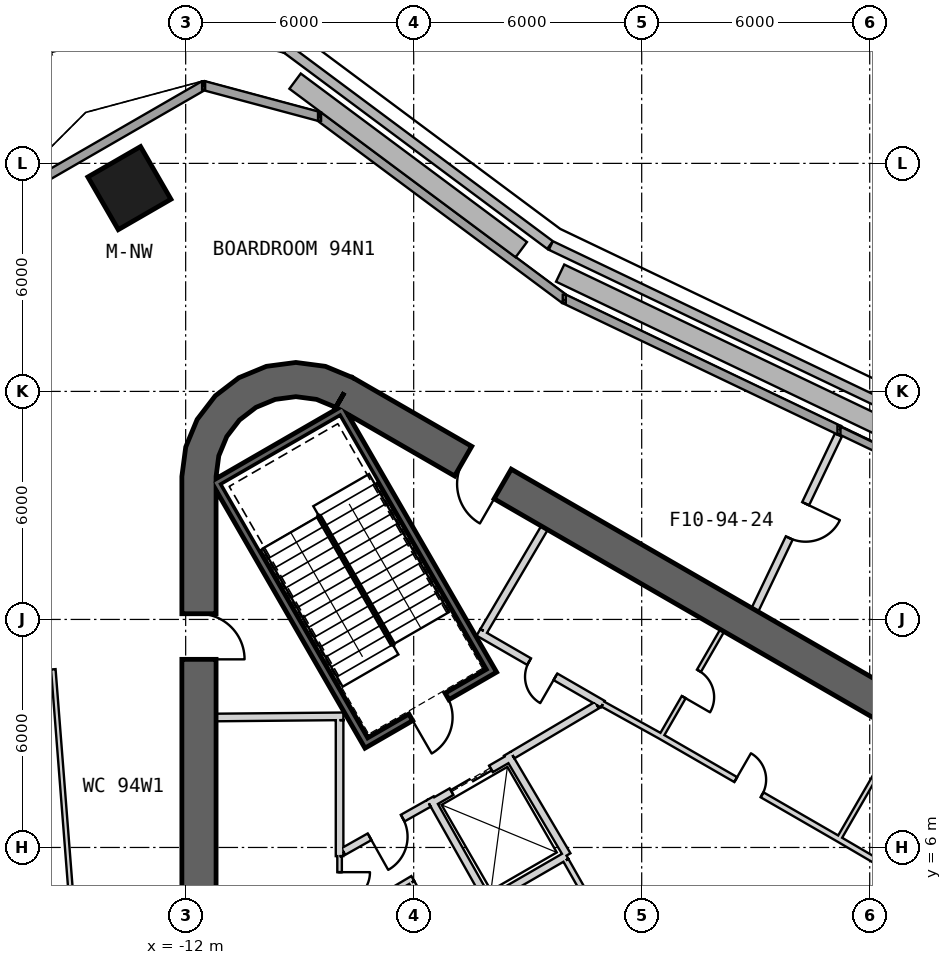
"""IFC4 building model, lengths in metres.
Left out: names, types, materials, properties, quantities, classifications, styles, units other than length and angle.
Written with IfcOpenShell. Run it as: python <this file> out.ifc"""

import sys

from ifc_helpers import new_model, si_unit, direction, frame, frame_2d, origin, origin_2d, place, context, subcontext, project, spatial, polyline, rectangle, outline, extrude, element, fill, save


model = new_model("IFC4")
c1 = context("Model", 3, precision=1e-05, world=origin(), true_north=direction((0.0, 1.0)))
c2 = subcontext(c1, "Body", "Model", "MODEL_VIEW")
j1 = project(units=[si_unit("LENGTHUNIT", "METRE"), si_unit("PLANEANGLEUNIT", "RADIAN")], contexts=[c1])
p1 = place(None, origin())
s1 = spatial("IfcSite", under=j1, at=p1, CompositionType="ELEMENT")
p2 = place(p1, origin())
s2 = spatial("IfcBuilding", under=s1, at=p2, CompositionType="ELEMENT")
p3 = place(p2, frame((0.0, 0.0, 415.3)))
s3 = spatial("IfcBuildingStorey", under=s2, at=p3, CompositionType="ELEMENT", Elevation=415.3)
p4 = place(p3, frame((-13.48, 23.349, -0.25), z_axis=(0.0, 0.0, 1.0), x_axis=(-0.5, 0.866025403784, 0.0)))
e1 = element("IfcColumn", 1, at=p4, inside=s3, PredefinedType="COLUMN", context=c2, shape_type="SweptSolid", body=[
    extrude(rectangle(XDim=1.6, YDim=1.6, at=origin_2d()), origin(), (0.0, 0.0, 1.0), 5.0),
])
p5 = place(p3, frame((19.475, 2.208, 0.0), z_axis=(0.0, 0.0, 1.0), x_axis=(-0.866028369851, 0.499994862586, 0.0)))
e2 = element("IfcWall", 2, at=p5, inside=s3, PredefinedType="SHEAR", context=c2, shape_type="SweptSolid", body=[
    extrude(rectangle(XDim=31.523, YDim=0.9, at=frame_2d((15.762, 0.0))), origin(), (0.0, 0.0, 1.0), 5.0),
])
p6 = place(p5, frame((3.612, 0.0, 0.0)))
e3 = element("IfcOpeningElement", 3, at=p6, cuts=e2, PredefinedType="OPENING", context=c2, shape_type="SweptSolid", body=[
    extrude(rectangle(XDim=1.2, YDim=2.4, at=frame_2d((0.6, 1.2))), frame((0.0, 0.46, 0.0), z_axis=(0.0, -1.0, 0.0), x_axis=(1.0, 0.0, 0.0)), (0.0, 0.0, 1.0), 0.92),
])
p7 = place(p5, frame((26.712, 0.0, 0.0)))
e4 = element("IfcOpeningElement", 4, at=p7, cuts=e2, PredefinedType="OPENING", context=c2, shape_type="SweptSolid", body=[
    extrude(rectangle(XDim=1.2, YDim=2.4, at=frame_2d((0.6, 1.2))), frame((0.0, 0.46, 0.0), z_axis=(0.0, -1.0, 0.0), x_axis=(1.0, 0.0, 0.0)), (0.0, 0.0, 1.0), 0.92),
])
p8 = place(p3, frame((-11.65, 15.762, 0.0), z_axis=(0.0, 0.0, 1.0), x_axis=(0.0, -1.0, 0.0)))
e5 = element("IfcWall", 5, at=p8, inside=s3, PredefinedType="SHEAR", context=c2, shape_type="SweptSolid", body=[
    extrude(rectangle(XDim=31.523, YDim=0.9, at=frame_2d((15.762, 0.0))), origin(), (0.0, 0.0, 1.0), 5.0),
])
p9 = place(p8, frame((3.612, 0.0, 0.0)))
e6 = element("IfcOpeningElement", 6, at=p9, cuts=e5, PredefinedType="OPENING", context=c2, shape_type="SweptSolid", body=[
    extrude(rectangle(XDim=1.2, YDim=2.4, at=frame_2d((0.6, 1.2))), frame((0.0, 0.46, 0.0), z_axis=(0.0, -1.0, 0.0), x_axis=(1.0, 0.0, 0.0)), (0.0, 0.0, 1.0), 0.92),
])
p10 = place(p8, frame((26.712, 0.0, 0.0)))
e7 = element("IfcOpeningElement", 7, at=p10, cuts=e5, PredefinedType="OPENING", context=c2, shape_type="SweptSolid", body=[
    extrude(rectangle(XDim=1.2, YDim=2.4, at=frame_2d((0.6, 1.2))), frame((0.0, 0.46, 0.0), z_axis=(0.0, -1.0, 0.0), x_axis=(1.0, 0.0, 0.0)), (0.0, 0.0, 1.0), 0.92),
])
p11 = place(p3, origin())
e8 = element("IfcWall", 8, at=p11, inside=s3, PredefinedType="SHEAR", context=c2, shape_type="SweptSolid", body=[
    extrude(outline(polyline([(-7.6, 18.36), (-8.323, 18.659), (-9.1, 18.762), (-9.876, 18.659), (-10.6, 18.36), (-11.221, 17.883), (-11.698, 17.262), (-11.998, 16.538), (-12.1, 15.762), (-11.2, 15.762), (-11.128, 16.305), (-10.919, 16.812), (-10.585, 17.247), (-10.15, 17.58), (-9.644, 17.79), (-9.1, 17.862), (-8.556, 17.79), (-8.05, 17.58), (-7.6, 18.36)])), origin(), (0.0, 0.0, 1.0), 5.0),
])
p12 = place(p3, frame((5.203, 16.976, 0.0), z_axis=(0.0, 0.0, 1.0), x_axis=(-0.902309733551, 0.431088325913, 0.0)))
e9 = element("IfcWall", 9, at=p12, inside=s3, PredefinedType="SOLIDWALL", context=c2, shape_type="SweptSolid", body=[
    extrude(rectangle(XDim=8.024, YDim=0.24, at=frame_2d((4.012, 0.0))), origin(), (0.0, 0.0, 1.0), 4.75),
])
p13 = place(p3, frame((-2.037, 20.435, 0.0), z_axis=(0.0, 0.0, 1.0), x_axis=(-0.801980505983, 0.59735020551, 0.0)))
e10 = element("IfcWall", 10, at=p13, inside=s3, PredefinedType="SOLIDWALL", context=c2, shape_type="SweptSolid", body=[
    extrude(rectangle(XDim=8.03, YDim=0.24, at=frame_2d((4.015, 0.0))), origin(), (0.0, 0.0, 1.0), 4.75),
])
p14 = place(p3, frame((-8.477, 25.231, 0.0), z_axis=(0.0, 0.0, 1.0), x_axis=(-0.96594046017, 0.258764424539, 0.0)))
e11 = element("IfcWall", 11, at=p14, inside=s3, PredefinedType="SOLIDWALL", context=c2, shape_type="SweptSolid", body=[
    extrude(rectangle(XDim=3.158, YDim=0.24, at=frame_2d((1.579, 0.0))), origin(), (0.0, 0.0, 1.0), 4.75),
])
p15 = place(p3, frame((-11.527, 26.048, 0.0), z_axis=(0.0, 0.0, 1.0), x_axis=(-0.866033863416, -0.499985347202, 0.0)))
e12 = element("IfcWall", 12, at=p15, inside=s3, PredefinedType="SOLIDWALL", context=c2, shape_type="SweptSolid", body=[
    extrude(rectangle(XDim=6.083, YDim=0.24, at=frame_2d((3.042, 0.0))), origin(), (0.0, 0.0, 1.0), 4.75),
])
p16 = place(p3, frame((12.407, 13.534, 0.0), z_axis=(0.0, 0.0, 1.0), x_axis=(-0.902318881861, 0.431069177091, 0.0)))
e13 = element("IfcWall", 13, at=p16, inside=s3, PredefinedType="SOLIDWALL", context=c2, shape_type="SweptSolid", body=[
    extrude(rectangle(XDim=7.984, YDim=0.2, at=frame_2d((3.992, 0.0))), origin(), (0.0, 0.0, 1.0), 4.75),
])
p17 = place(p16, frame((3.092, 0.0, 0.0)))
e14 = element("IfcOpeningElement", 14, at=p17, cuts=e13, PredefinedType="OPENING", context=c2, shape_type="SweptSolid", body=[
    extrude(rectangle(XDim=1.8, YDim=2.4, at=frame_2d((0.9, 1.2))), frame((0.0, 0.11, 0.0), z_axis=(0.0, -1.0, 0.0), x_axis=(1.0, 0.0, 0.0)), (0.0, 0.0, 1.0), 0.22),
])
p18 = place(p3, frame((-12.47, 27.86, 0.04), z_axis=(0.0, 0.0, 1.0), x_axis=(0.965922490288, -0.258831494908, 0.0)))
e15 = element("IfcWall", 15, at=p18, inside=s3, PredefinedType="PARAPET", context=c2, shape_type="SweptSolid", body=[
    extrude(rectangle(XDim=3.198, YDim=0.25, at=frame_2d((1.599, 0.0))), origin(), (0.0, 0.0, 1.0), 1.2),
])
p19 = place(p3, frame((-9.339, 27.012, 0.04), z_axis=(0.0, 0.0, 1.0), x_axis=(0.801993270913, -0.5973330674, 0.0)))
e16 = element("IfcWall", 16, at=p19, inside=s3, PredefinedType="PARAPET", context=c2, shape_type="SweptSolid", body=[
    extrude(rectangle(XDim=8.638, YDim=0.25, at=frame_2d((4.319, 0.0))), origin(), (0.0, 0.0, 1.0), 1.2),
])
p20 = place(p3, frame((-2.391, 21.84, 0.04), z_axis=(0.0, 0.0, 1.0), x_axis=(0.902315972125, -0.43107526773, 0.0)))
e17 = element("IfcWall", 17, at=p20, inside=s3, PredefinedType="PARAPET", context=c2, shape_type="SweptSolid", body=[
    extrude(rectangle(XDim=26.04, YDim=0.25, at=frame_2d((13.02, 0.0))), origin(), (0.0, 0.0, 1.0), 1.2),
])
p21 = place(p3, frame((-9.121, 26.164, 0.04), z_axis=(0.0, 0.0, 1.0), x_axis=(0.801981083113, -0.597349430677, 0.0)))
e18 = element("IfcWall", 18, at=p21, inside=s3, PredefinedType="PARAPET", context=c2, shape_type="SweptSolid", body=[
    extrude(rectangle(XDim=7.422, YDim=0.5, at=frame_2d((3.711, 0.0))), origin(), (0.0, 0.0, 1.0), 0.6),
])
p22 = place(p3, frame((-2.146, 21.113, 0.04), z_axis=(0.0, 0.0, 1.0), x_axis=(0.902316759071, -0.43107362051, 0.0)))
e19 = element("IfcWall", 19, at=p22, inside=s3, PredefinedType="PARAPET", context=c2, shape_type="SweptSolid", body=[
    extrude(rectangle(XDim=24.864, YDim=0.5, at=frame_2d((12.432, 0.0))), origin(), (0.0, 0.0, 1.0), 0.6),
])
p23 = place(p3, frame((-11.245, 15.678, -0.25), z_axis=(0.0, 0.0, 1.0), x_axis=(0.499977274689, -0.866038523851, 0.0)))
e20 = element("IfcWall", 20, at=p23, inside=s3, PredefinedType="SHEAR", context=c2, shape_type="SweptSolid", body=[
    extrude(rectangle(XDim=8.1, YDim=0.2, at=frame_2d((4.05, 0.0))), origin(), (0.0, 0.0, 1.0), 5.0),
])
p24 = place(p3, frame((-7.818, 17.541, -0.25), z_axis=(0.0, 0.0, 1.0), x_axis=(-0.866044365799, -0.499967155389, 0.0)))
e21 = element("IfcWall", 21, at=p24, inside=s3, PredefinedType="SHEAR", context=c2, shape_type="SweptSolid", body=[
    extrude(rectangle(XDim=3.8, YDim=0.2, at=frame_2d((1.9, 0.0))), origin(), (0.0, 0.0, 1.0), 5.0),
])
p25 = place(p3, frame((-7.854, 17.405, -0.25), z_axis=(0.0, 0.0, 1.0), x_axis=(0.499997992926, -0.866026562566, 0.0)))
e22 = element("IfcWall", 22, at=p25, inside=s3, PredefinedType="SHEAR", context=c2, shape_type="SweptSolid", body=[
    extrude(rectangle(XDim=7.9, YDim=0.2, at=frame_2d((3.95, 0.0))), origin(), (0.0, 0.0, 1.0), 5.0),
])
p26 = place(p3, frame((-7.159, 8.8, -0.25), z_axis=(0.0, 0.0, 1.0), x_axis=(0.866047807691, 0.499961193289, 0.0)))
e23 = element("IfcWall", 23, at=p26, inside=s3, PredefinedType="SHEAR", context=c2, shape_type="SweptSolid", body=[
    extrude(rectangle(XDim=3.6, YDim=0.2, at=frame_2d((1.8, 0.0))), origin(), (0.0, 0.0, 1.0), 5.0),
])
p27 = place(p26, frame((1.25, 0.0, 0.25)))
e24 = element("IfcOpeningElement", 24, at=p27, cuts=e23, PredefinedType="OPENING", context=c2, shape_type="SweptSolid", body=[
    extrude(rectangle(XDim=1.1, YDim=2.1, at=frame_2d((0.55, 1.05))), frame((0.0, 0.11, 0.0), z_axis=(0.0, -1.0, 0.0), x_axis=(1.0, 0.0, 0.0)), (0.0, 0.0, 1.0), 0.22),
])
p28 = place(p3, frame((-5.524, 7.168, 0.0), z_axis=(0.0, 0.0, 1.0), x_axis=(0.866024647952, 0.500001309137, 0.0)))
e25 = element("IfcWall", 25, at=p28, inside=s3, PredefinedType="PLUMBINGWALL", context=c2, shape_type="SweptSolid", body=[
    extrude(rectangle(XDim=2.4, YDim=0.2, at=frame_2d((1.2, 0.0))), origin(), (0.0, 0.0, 1.0), 4.75),
])
p29 = place(p28, frame((0.6, 0.0, 0.0)))
e26 = element("IfcOpeningElement", 26, at=p29, cuts=e25, PredefinedType="OPENING", context=c2, shape_type="SweptSolid", body=[
    extrude(rectangle(XDim=1.2, YDim=2.4, at=frame_2d((0.6, 1.2))), frame((0.0, 0.11, 0.0), z_axis=(0.0, -1.0, 0.0), x_axis=(1.0, 0.0, 0.0)), (0.0, 0.0, 1.0), 0.22),
])
p30 = place(p3, frame((-3.538, 8.465, 0.0), z_axis=(0.0, 0.0, 1.0), x_axis=(0.508647062354, -0.860975125052, 0.0)))
e27 = element("IfcWall", 27, at=p30, inside=s3, PredefinedType="PLUMBINGWALL", context=c2, shape_type="SweptSolid", body=[
    extrude(rectangle(XDim=3.1, YDim=0.2, at=frame_2d((1.55, 0.0))), origin(), (0.0, 0.0, 1.0), 4.75),
])
p31 = place(p3, frame((-1.979, 5.786, 0.0), z_axis=(0.0, 0.0, 1.0), x_axis=(-0.866016689309, -0.500015093611, 0.0)))
e28 = element("IfcWall", 28, at=p31, inside=s3, PredefinedType="PLUMBINGWALL", context=c2, shape_type="SweptSolid", body=[
    extrude(rectangle(XDim=2.479, YDim=0.2, at=frame_2d((1.24, 0.0))), origin(), (0.0, 0.0, 1.0), 4.75),
])
p32 = place(p3, frame((-5.562, 7.296, 0.0), z_axis=(0.0, 0.0, 1.0), x_axis=(0.49134651263, -0.870964180966, 0.0)))
e29 = element("IfcWall", 29, at=p32, inside=s3, PredefinedType="PLUMBINGWALL", context=c2, shape_type="SweptSolid", body=[
    extrude(rectangle(XDim=3.0, YDim=0.2, at=frame_2d((1.5, 0.0))), origin(), (0.0, 0.0, 1.0), 4.75),
])
p33 = place(p3, frame((-7.85, 9.451, 0.0), z_axis=(0.0, 0.0, 1.0), x_axis=(-0.999957167047, -0.009255488683, 0.0)))
e30 = element("IfcWall", 30, at=p33, inside=s3, PredefinedType="PARTITIONING", context=c2, shape_type="SweptSolid", body=[
    extrude(rectangle(XDim=3.35, YDim=0.2, at=frame_2d((1.675, 0.0))), origin(), (0.0, 0.0, 1.0), 4.75),
])
p34 = place(p3, frame((-7.95, 5.772, 0.0), z_axis=(0.0, 0.0, 1.0), x_axis=(0.0, 1.0, 0.0)))
e31 = element("IfcWall", 31, at=p34, inside=s3, PredefinedType="PARTITIONING", context=c2, shape_type="SweptSolid", body=[
    extrude(rectangle(XDim=3.578, YDim=0.2, at=frame_2d((1.789, 0.0))), origin(), (0.0, 0.0, 1.0), 4.75),
])
p35 = place(p3, frame((-7.95, 4.128, 0.0), z_axis=(0.0, 0.0, 1.0), x_axis=(0.0, 1.0, 0.0)))
e32 = element("IfcWall", 32, at=p35, inside=s3, PredefinedType="PARTITIONING", context=c2, shape_type="SweptSolid", body=[
    extrude(rectangle(XDim=1.644, YDim=0.12, at=frame_2d((0.822, 0.0))), origin(), (0.0, 0.0, 1.0), 4.75),
])
p36 = place(p35, frame((0.422, 0.0, 0.0)))
e33 = element("IfcOpeningElement", 33, at=p36, cuts=e32, PredefinedType="OPENING", context=c2, shape_type="SweptSolid", body=[
    extrude(rectangle(XDim=0.8, YDim=2.1, at=frame_2d((0.4, 1.05))), frame((0.0, 0.07, 0.0), z_axis=(0.0, -1.0, 0.0), x_axis=(1.0, 0.0, 0.0)), (0.0, 0.0, 1.0), 0.14),
])
p37 = place(p3, frame((6.795, 9.01, 0.0), z_axis=(0.0, 0.0, 1.0), x_axis=(-0.499984717929, -0.866034226713, 0.0)))
e34 = element("IfcWall", 34, at=p37, inside=s3, PredefinedType="PARTITIONING", context=c2, shape_type="SweptSolid", body=[
    extrude(rectangle(XDim=3.25, YDim=0.12, at=frame_2d((1.625, 0.0))), origin(), (0.0, 0.0, 1.0), 4.75),
])
p38 = place(p3, frame((-4.296, 11.66, 0.0), z_axis=(0.0, 0.0, 1.0), x_axis=(0.866027389382, -0.499996560828, 0.0)))
e35 = element("IfcWall", 35, at=p38, inside=s3, PredefinedType="PARTITIONING", context=c2, shape_type="SweptSolid", body=[
    extrude(rectangle(XDim=3.778, YDim=0.2, at=frame_2d((1.889, 0.0))), origin(), (0.0, 0.0, 1.0), 4.75),
])
p39 = place(p38, frame((1.539, 0.0, 0.0)))
e36 = element("IfcOpeningElement", 36, at=p39, cuts=e35, PredefinedType="OPENING", context=c2, shape_type="SweptSolid", body=[
    extrude(rectangle(XDim=0.8, YDim=2.1, at=frame_2d((0.4, 1.05))), frame((0.0, 0.11, 0.0), z_axis=(0.0, -1.0, 0.0), x_axis=(1.0, 0.0, 0.0)), (0.0, 0.0, 1.0), 0.22),
])
p40 = place(p3, frame((8.974, 3.999, 0.0), z_axis=(0.0, 0.0, 1.0), x_axis=(-0.862665579, 0.505774751059, 0.0)))
e37 = element("IfcWall", 37, at=p40, inside=s3, PredefinedType="PLUMBINGWALL", context=c2, shape_type="SweptSolid", body=[
    extrude(rectangle(XDim=4.423, YDim=0.15, at=frame_2d((2.211, 0.0))), origin(), (0.0, 0.0, 1.0), 4.75),
])
p41 = place(p3, frame((2.119, 11.709, 0.0), z_axis=(0.0, 0.0, 1.0), x_axis=(-0.500017246033, -0.866015446554, 0.0)))
e38 = element("IfcWall", 38, at=p41, inside=s3, PredefinedType="PARTITIONING", context=c2, shape_type="SweptSolid", body=[
    extrude(rectangle(XDim=3.25, YDim=0.12, at=frame_2d((1.625, 0.0))), origin(), (0.0, 0.0, 1.0), 4.75),
])
p42 = place(p41, frame((1.225, 0.0, 0.0)))
e39 = element("IfcOpeningElement", 39, at=p42, cuts=e38, PredefinedType="OPENING", context=c2, shape_type="SweptSolid", body=[
    extrude(rectangle(XDim=0.8, YDim=2.1, at=frame_2d((0.4, 1.05))), frame((0.0, 0.07, 0.0), z_axis=(0.0, -1.0, 0.0), x_axis=(1.0, 0.0, 0.0)), (0.0, 0.0, 1.0), 0.14),
])
p43 = place(p3, frame((5.159, 6.236, 0.0), z_axis=(0.0, 0.0, 1.0), x_axis=(-0.866028230842, 0.499995103361, 0.0)))
e40 = element("IfcWall", 40, at=p43, inside=s3, PredefinedType="PLUMBINGWALL", context=c2, shape_type="SweptSolid", body=[
    extrude(rectangle(XDim=5.4, YDim=0.15, at=frame_2d((2.7, 0.0))), origin(), (0.0, 0.0, 1.0), 4.75),
])
p44 = place(p43, frame((2.3, 0.0, 0.0)))
e41 = element("IfcOpeningElement", 41, at=p44, cuts=e40, PredefinedType="OPENING", context=c2, shape_type="SweptSolid", body=[
    extrude(rectangle(XDim=0.8, YDim=2.1, at=frame_2d((0.4, 1.05))), frame((0.0, 0.085, 0.0), z_axis=(0.0, -1.0, 0.0), x_axis=(1.0, 0.0, 0.0)), (0.0, 0.0, 1.0), 0.17),
])
p45 = place(p3, frame((-2.558, 14.409, 0.0), z_axis=(0.0, 0.0, 1.0), x_axis=(-0.508018930956, -0.861345903683, 0.0)))
e42 = element("IfcWall", 42, at=p45, inside=s3, PredefinedType="PARTITIONING", context=c2, shape_type="SweptSolid", body=[
    extrude(rectangle(XDim=3.15, YDim=0.2, at=frame_2d((1.575, 0.0))), origin(), (0.0, 0.0, 1.0), 4.75),
])
p46 = place(p3, frame((0.483, 8.936, 0.0), z_axis=(0.0, 0.0, 1.0), x_axis=(-0.874290944206, 0.485402250592, 0.0)))
e43 = element("IfcWall", 43, at=p46, inside=s3, PredefinedType="PLUMBINGWALL", context=c2, shape_type="SweptSolid", body=[
    extrude(rectangle(XDim=1.723, YDim=0.15, at=frame_2d((0.861, 0.0))), origin(), (0.0, 0.0, 1.0), 4.75),
])
p47 = place(p3, frame((-1.179, 9.745, 0.0), z_axis=(0.0, 0.0, 1.0), x_axis=(-0.860630814782, -0.509229418482, 0.0)))
e44 = element("IfcWall", 44, at=p47, inside=s3, PredefinedType="PARTITIONING", context=c2, shape_type="SweptSolid", body=[
    extrude(rectangle(XDim=2.582, YDim=0.2, at=frame_2d((1.291, 0.0))), origin(), (0.0, 0.0, 1.0), 4.75),
])
p48 = place(p3, frame((-5.6, 7.16, 0.0), z_axis=(0.0, 0.0, 1.0), x_axis=(-0.871350695252, -0.490660744185, 0.0)))
e45 = element("IfcWall", 45, at=p48, inside=s3, PredefinedType="PARTITIONING", context=c2, shape_type="SweptSolid", body=[
    extrude(rectangle(XDim=2.582, YDim=0.2, at=frame_2d((1.291, 0.0))), origin(), (0.0, 0.0, 1.0), 4.75),
])
p49 = place(p48, frame((0.791, 0.0, 0.0)))
e46 = element("IfcOpeningElement", 46, at=p49, cuts=e45, PredefinedType="OPENING", context=c2, shape_type="SweptSolid", body=[
    extrude(rectangle(XDim=1.0, YDim=2.1, at=frame_2d((0.5, 1.05))), frame((0.0, 0.11, 0.0), z_axis=(0.0, -1.0, 0.0), x_axis=(1.0, 0.0, 0.0)), (0.0, 0.0, 1.0), 0.22),
])
p50 = place(p3, frame((-1.994, 5.661, 0.0), z_axis=(0.0, 0.0, 1.0), x_axis=(0.494341211302, -0.869267948798, 0.0)))
e47 = element("IfcWall", 47, at=p50, inside=s3, PredefinedType="PLUMBINGWALL", context=c2, shape_type="SweptSolid", body=[
    extrude(rectangle(XDim=4.361, YDim=0.15, at=frame_2d((2.18, 0.0))), origin(), (0.0, 0.0, 1.0), 4.75),
])
p51 = place(p3, frame((-6.024, 5.183, 0.0), z_axis=(0.0, 0.0, 1.0), x_axis=(-0.860114558627, -0.510100917503, 0.0)))
e48 = element("IfcWall", 48, at=p51, inside=s3, PredefinedType="PLUMBINGWALL", context=c2, shape_type="SweptSolid", body=[
    extrude(rectangle(XDim=2.152, YDim=0.15, at=frame_2d((1.076, 0.0))), origin(), (0.0, 0.0, 1.0), 4.75),
])
p52 = place(p3, frame((-4.551, 2.482, 0.0), z_axis=(0.0, 0.0, 1.0), x_axis=(-0.499990139034, 0.866031096941, 0.0)))
e49 = element("IfcWall", 49, at=p52, inside=s3, PredefinedType="PLUMBINGWALL", context=c2, shape_type="SweptSolid", body=[
    extrude(rectangle(XDim=3.0, YDim=0.15, at=frame_2d((1.5, 0.0))), origin(), (0.0, 0.0, 1.0), 4.75),
])
p53 = place(p3, frame((-15.483, 10.688, 0.0), z_axis=(0.0, 0.0, 1.0), x_axis=(0.077862584508, -0.996964100624, 0.0)))
e50 = element("IfcWall", 50, at=p53, inside=s3, PredefinedType="PARTITIONING", context=c2, shape_type="SweptSolid", body=[
    extrude(rectangle(XDim=6.5, YDim=0.12, at=frame_2d((3.25, 0.0))), origin(), (0.0, 0.0, 1.0), 4.75),
])
p54 = place(p3, frame((5.176, 16.85, 0.0), z_axis=(0.0, 0.0, 1.0), x_axis=(-0.431140150859, -0.902284971789, 0.0)))
e51 = element("IfcWall", 51, at=p54, inside=s3, PredefinedType="PARTITIONING", context=c2, shape_type="SweptSolid", body=[
    extrude(rectangle(XDim=5.096, YDim=0.2, at=frame_2d((2.548, 0.0))), origin(), (0.0, 0.0, 1.0), 4.75),
])
p55 = place(p54, frame((2.0, 0.0, 0.0)))
e52 = element("IfcOpeningElement", 52, at=p55, cuts=e51, PredefinedType="OPENING", context=c2, shape_type="SweptSolid", body=[
    extrude(rectangle(XDim=1.0, YDim=2.1, at=frame_2d((0.5, 1.05))), frame((0.0, 0.11, 0.0), z_axis=(0.0, -1.0, 0.0), x_axis=(1.0, 0.0, 0.0)), (0.0, 0.0, 1.0), 0.22),
])
p56 = place(p27, origin())
e53 = element("IfcDoor", 53, at=p56, inside=s3, OperationType="SINGLE_SWING_LEFT", PredefinedType="USERDEFINED", context=c2, shape_type="SweptSolid", body=[
    extrude(rectangle(XDim=1.1, YDim=2.1, at=frame_2d((0.55, 1.05))), frame((0.0, 0.025, 0.0), z_axis=(0.0, -1.0, 0.0), x_axis=(1.0, 0.0, 0.0)), (0.0, 0.0, 1.0), 0.05),
])
fill(e24, e53)
p57 = place(p49, origin())
e54 = element("IfcDoor", 54, at=p57, inside=s3, OperationType="SINGLE_SWING_RIGHT", PredefinedType="USERDEFINED", context=c2, shape_type="SweptSolid", body=[
    extrude(rectangle(XDim=1.0, YDim=2.1, at=frame_2d((0.5, 1.05))), frame((0.0, 0.025, 0.0), z_axis=(0.0, -1.0, 0.0), x_axis=(1.0, 0.0, 0.0)), (0.0, 0.0, 1.0), 0.05),
])
fill(e46, e54)
p58 = place(p29, origin())
e55 = element("IfcDoor", 55, at=p58, inside=s3, OperationType="SLIDING_TO_LEFT", PredefinedType="USERDEFINED", context=c2, shape_type="SweptSolid", body=[
    extrude(rectangle(XDim=1.2, YDim=2.4, at=frame_2d((0.6, 1.2))), frame((0.0, 0.025, 0.0), z_axis=(0.0, -1.0, 0.0), x_axis=(1.0, 0.0, 0.0)), (0.0, 0.0, 1.0), 0.05),
])
fill(e26, e55)
p59 = place(p36, origin())
e56 = element("IfcDoor", 56, at=p59, inside=s3, OperationType="SINGLE_SWING_RIGHT", PredefinedType="USERDEFINED", context=c2, shape_type="SweptSolid", body=[
    extrude(rectangle(XDim=0.8, YDim=2.1, at=frame_2d((0.4, 1.05))), frame((0.0, 0.025, 0.0), z_axis=(0.0, -1.0, 0.0), x_axis=(1.0, 0.0, 0.0)), (0.0, 0.0, 1.0), 0.05),
])
fill(e33, e56)
p60 = place(p42, origin())
e57 = element("IfcDoor", 57, at=p60, inside=s3, OperationType="SINGLE_SWING_RIGHT", PredefinedType="USERDEFINED", context=c2, shape_type="SweptSolid", body=[
    extrude(rectangle(XDim=0.8, YDim=2.1, at=frame_2d((0.4, 1.05))), frame((0.0, 0.025, 0.0), z_axis=(0.0, -1.0, 0.0), x_axis=(1.0, 0.0, 0.0)), (0.0, 0.0, 1.0), 0.05),
])
fill(e39, e57)
p61 = place(p39, origin())
e58 = element("IfcDoor", 58, at=p61, inside=s3, OperationType="SINGLE_SWING_RIGHT", PredefinedType="USERDEFINED", context=c2, shape_type="SweptSolid", body=[
    extrude(rectangle(XDim=0.8, YDim=2.1, at=frame_2d((0.4, 1.05))), frame((0.0, 0.025, 0.0), z_axis=(0.0, -1.0, 0.0), x_axis=(1.0, 0.0, 0.0)), (0.0, 0.0, 1.0), 0.05),
])
fill(e36, e58)
p62 = place(p44, origin())
e59 = element("IfcDoor", 59, at=p62, inside=s3, OperationType="SINGLE_SWING_RIGHT", PredefinedType="USERDEFINED", context=c2, shape_type="SweptSolid", body=[
    extrude(rectangle(XDim=0.8, YDim=2.1, at=frame_2d((0.4, 1.05))), frame((0.0, 0.025, 0.0), z_axis=(0.0, -1.0, 0.0), x_axis=(1.0, 0.0, 0.0)), (0.0, 0.0, 1.0), 0.05),
])
fill(e41, e59)
p63 = place(p55, origin())
e60 = element("IfcDoor", 60, at=p63, inside=s3, OperationType="SINGLE_SWING_LEFT", PredefinedType="USERDEFINED", context=c2, shape_type="SweptSolid", body=[
    extrude(rectangle(XDim=1.0, YDim=2.1, at=frame_2d((0.5, 1.05))), frame((0.0, 0.025, 0.0), z_axis=(0.0, -1.0, 0.0), x_axis=(1.0, 0.0, 0.0)), (0.0, 0.0, 1.0), 0.05),
])
fill(e52, e60)
p64 = place(p7, origin())
e61 = element("IfcDoor", 61, at=p64, inside=s3, OperationType="SINGLE_SWING_LEFT", PredefinedType="USERDEFINED", context=c2, shape_type="SweptSolid", body=[
    extrude(rectangle(XDim=1.2, YDim=2.4, at=frame_2d((0.6, 1.2))), frame((0.0, 0.025, 0.0), z_axis=(0.0, -1.0, 0.0), x_axis=(1.0, 0.0, 0.0)), (0.0, 0.0, 1.0), 0.05),
])
fill(e4, e61)
p65 = place(p9, origin())
e62 = element("IfcDoor", 62, at=p65, inside=s3, OperationType="SINGLE_SWING_RIGHT", PredefinedType="USERDEFINED", context=c2, shape_type="SweptSolid", body=[
    extrude(rectangle(XDim=1.2, YDim=2.4, at=frame_2d((0.6, 1.2))), frame((0.0, 0.025, 0.0), z_axis=(0.0, -1.0, 0.0), x_axis=(1.0, 0.0, 0.0)), (0.0, 0.0, 1.0), 0.05),
])
fill(e6, e62)
save(model, sys.argv[1])
